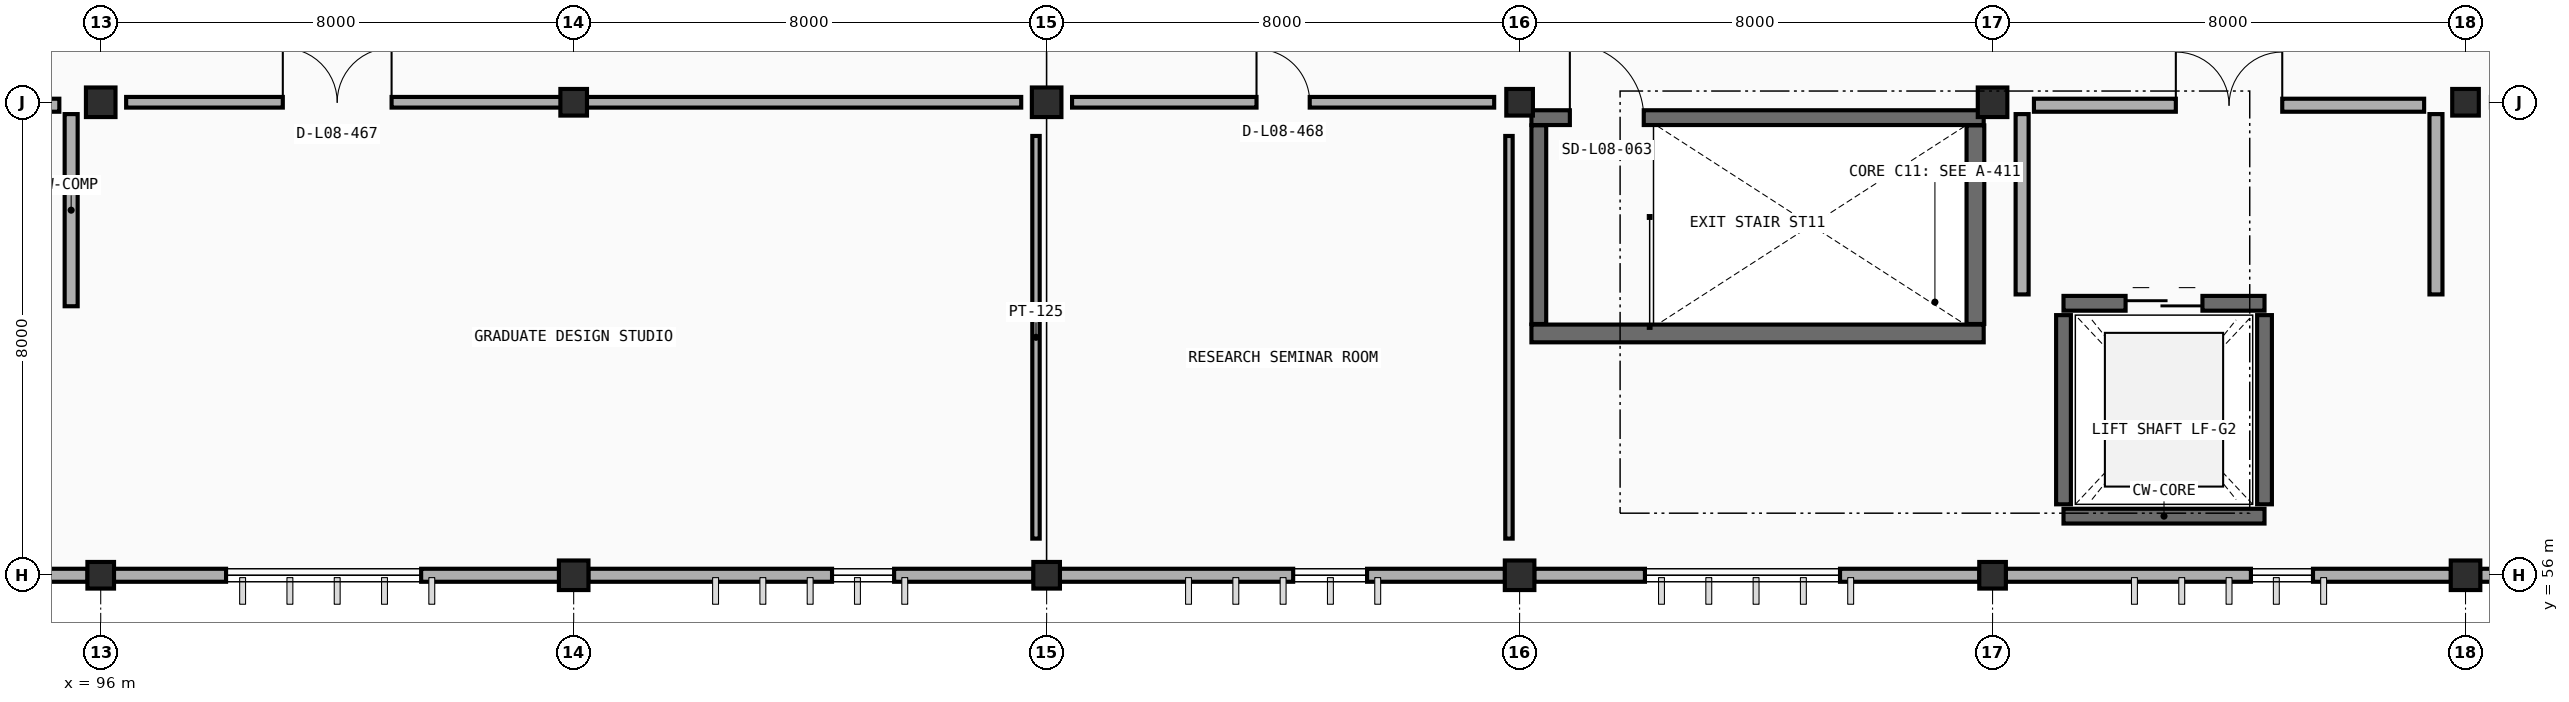
"""IFC4 building model, lengths in metres.
Left out: names, types, materials, properties, quantities, classifications, styles, units other than length and angle.
Written with IfcOpenShell. Run it as: python <this file> out.ifc"""

import sys

from ifc_helpers import new_model, si_unit, direction, frame, frame_2d, origin, origin_2d, place, context, subcontext, project, spatial, rectangle, extrude, element, fill, save


model = new_model("IFC4")
c1 = context("Model", 3, precision=1e-05, world=origin(), true_north=direction((0.0, 1.0)))
c2 = subcontext(c1, "Body", "Model", "MODEL_VIEW")
j1 = project(units=[si_unit("LENGTHUNIT", "METRE"), si_unit("PLANEANGLEUNIT", "RADIAN")], contexts=[c1])
p1 = place(None, origin())
s1 = spatial("IfcSite", under=j1, at=p1, CompositionType="ELEMENT")
p2 = place(p1, origin())
s2 = spatial("IfcBuilding", under=s1, at=p2, CompositionType="ELEMENT")
p3 = place(p2, frame((0.0, 0.0, 30.6)))
s3 = spatial("IfcBuildingStorey", under=s2, at=p3, CompositionType="ELEMENT", Elevation=30.6)
p4 = place(p3, frame((96.0, 56.0, 0.0), z_axis=(0.0, 0.0, 1.0), x_axis=(1.0, 0.0, 0.0)))
e1 = element("IfcColumn", 1, at=p4, inside=s3, PredefinedType="COLUMN", context=c2, shape_type="SweptSolid", body=[
    extrude(rectangle(XDim=0.45, YDim=0.45, at=origin_2d()), origin(), (0.0, 0.0, 1.0), 4.2),
])
p5 = place(p3, frame((104.0, 56.0, 0.0), z_axis=(0.0, 0.0, 1.0), x_axis=(1.0, 0.0, 0.0)))
e2 = element("IfcColumn", 2, at=p5, inside=s3, PredefinedType="COLUMN", context=c2, shape_type="SweptSolid", body=[
    extrude(rectangle(XDim=0.5, YDim=0.5, at=origin_2d()), origin(), (0.0, 0.0, 1.0), 4.2),
])
p6 = place(p3, frame((112.0, 56.0, 0.0), z_axis=(0.0, 0.0, 1.0), x_axis=(1.0, 0.0, 0.0)))
e3 = element("IfcColumn", 3, at=p6, inside=s3, PredefinedType="COLUMN", context=c2, shape_type="SweptSolid", body=[
    extrude(rectangle(XDim=0.45, YDim=0.45, at=origin_2d()), origin(), (0.0, 0.0, 1.0), 4.2),
])
p7 = place(p3, frame((120.0, 56.0, 0.0), z_axis=(0.0, 0.0, 1.0), x_axis=(1.0, 0.0, 0.0)))
e4 = element("IfcColumn", 4, at=p7, inside=s3, PredefinedType="COLUMN", context=c2, shape_type="SweptSolid", body=[
    extrude(rectangle(XDim=0.5, YDim=0.5, at=origin_2d()), origin(), (0.0, 0.0, 1.0), 4.2),
])
p8 = place(p3, frame((128.0, 56.0, 0.0), z_axis=(0.0, 0.0, 1.0), x_axis=(1.0, 0.0, 0.0)))
e5 = element("IfcColumn", 5, at=p8, inside=s3, PredefinedType="COLUMN", context=c2, shape_type="SweptSolid", body=[
    extrude(rectangle(XDim=0.45, YDim=0.45, at=origin_2d()), origin(), (0.0, 0.0, 1.0), 4.2),
])
for number, where, z_axis, x_axis in (
    (6, (136.0, 56.0, 0.0), (0.0, 0.0, 1.0), (1.0, 0.0, 0.0)),
    (7, (96.0, 64.0, 0.0), (0.0, 0.0, 1.0), (1.0, 0.0, 0.0)),
):
    element("IfcColumn", number, at=place(p3, frame(where, z_axis=z_axis, x_axis=x_axis)), inside=s3, PredefinedType="COLUMN", context=c2, shape_type="SweptSolid", body=[
        extrude(rectangle(XDim=0.5, YDim=0.5, at=origin_2d()), origin(), (0.0, 0.0, 1.0), 4.2),
    ])
p9 = place(p3, frame((104.0, 64.0, 0.0), z_axis=(0.0, 0.0, 1.0), x_axis=(1.0, 0.0, 0.0)))
e8 = element("IfcColumn", 8, at=p9, inside=s3, PredefinedType="COLUMN", context=c2, shape_type="SweptSolid", body=[
    extrude(rectangle(XDim=0.45, YDim=0.45, at=origin_2d()), origin(), (0.0, 0.0, 1.0), 4.2),
])
p10 = place(p3, frame((112.0, 64.0, 0.0), z_axis=(0.0, 0.0, 1.0), x_axis=(1.0, 0.0, 0.0)))
e9 = element("IfcColumn", 9, at=p10, inside=s3, PredefinedType="COLUMN", context=c2, shape_type="SweptSolid", body=[
    extrude(rectangle(XDim=0.5, YDim=0.5, at=origin_2d()), origin(), (0.0, 0.0, 1.0), 4.2),
])
p11 = place(p3, frame((120.0, 64.0, 0.0), z_axis=(0.0, 0.0, 1.0), x_axis=(1.0, 0.0, 0.0)))
e10 = element("IfcColumn", 10, at=p11, inside=s3, PredefinedType="COLUMN", context=c2, shape_type="SweptSolid", body=[
    extrude(rectangle(XDim=0.45, YDim=0.45, at=origin_2d()), origin(), (0.0, 0.0, 1.0), 4.2),
])
p12 = place(p3, frame((128.0, 64.0, 0.0), z_axis=(0.0, 0.0, 1.0), x_axis=(1.0, 0.0, 0.0)))
e11 = element("IfcColumn", 11, at=p12, inside=s3, PredefinedType="COLUMN", context=c2, shape_type="SweptSolid", body=[
    extrude(rectangle(XDim=0.5, YDim=0.5, at=origin_2d()), origin(), (0.0, 0.0, 1.0), 4.2),
])
p13 = place(p3, frame((136.0, 64.0, 0.0), z_axis=(0.0, 0.0, 1.0), x_axis=(1.0, 0.0, 0.0)))
e12 = element("IfcColumn", 12, at=p13, inside=s3, PredefinedType="COLUMN", context=c2, shape_type="SweptSolid", body=[
    extrude(rectangle(XDim=0.45, YDim=0.45, at=origin_2d()), origin(), (0.0, 0.0, 1.0), 4.2),
])
p14 = place(p3, frame((95.778, 56.0, 0.0), z_axis=(0.0, 0.0, 1.0), x_axis=(-1.0, 0.0, 0.0)))
e13 = element("IfcWall", 13, at=p14, inside=s3, PredefinedType="STANDARD", context=c2, shape_type="SweptSolid", body=[
    extrude(rectangle(XDim=7.531, YDim=0.22, at=frame_2d((3.766, 0.0))), origin(), (0.0, 0.0, 1.0), 3.335),
])
p15 = place(p14, frame((2.358, 0.0, 0.9)))
e14 = element("IfcOpeningElement", 14, at=p15, cuts=e13, PredefinedType="OPENING", context=c2, shape_type="SweptSolid", body=[
    extrude(rectangle(XDim=1.25, YDim=1.25, at=frame_2d((0.625, 0.625))), frame((0.0, 0.12, 0.0), z_axis=(0.0, -1.0, 0.0), x_axis=(1.0, 0.0, 0.0)), (0.0, 0.0, 1.0), 0.24),
])
p16 = place(p3, frame((103.753, 56.0, 0.0), z_axis=(0.0, 0.0, 1.0), x_axis=(-1.0, 0.0, 0.0)))
e15 = element("IfcWall", 15, at=p16, inside=s3, PredefinedType="STANDARD", context=c2, shape_type="SweptSolid", body=[
    extrude(rectangle(XDim=7.531, YDim=0.22, at=frame_2d((3.766, 0.0))), origin(), (0.0, 0.0, 1.0), 3.335),
])
p17 = place(p16, frame((2.333, 0.0, 0.9)))
e16 = element("IfcOpeningElement", 16, at=p17, cuts=e15, PredefinedType="OPENING", context=c2, shape_type="SweptSolid", body=[
    extrude(rectangle(XDim=3.3, YDim=1.75, at=frame_2d((1.65, 0.875))), frame((0.0, 0.12, 0.0), z_axis=(0.0, -1.0, 0.0), x_axis=(1.0, 0.0, 0.0)), (0.0, 0.0, 1.0), 0.24),
])
p18 = place(p3, frame((111.778, 56.0, 0.0), z_axis=(0.0, 0.0, 1.0), x_axis=(-1.0, 0.0, 0.0)))
e17 = element("IfcWall", 17, at=p18, inside=s3, PredefinedType="STANDARD", context=c2, shape_type="SweptSolid", body=[
    extrude(rectangle(XDim=7.531, YDim=0.22, at=frame_2d((3.766, 0.0))), origin(), (0.0, 0.0, 1.0), 3.335),
])
p19 = place(p18, frame((2.358, 0.0, 0.9)))
e18 = element("IfcOpeningElement", 18, at=p19, cuts=e17, PredefinedType="OPENING", context=c2, shape_type="SweptSolid", body=[
    extrude(rectangle(XDim=1.05, YDim=1.25, at=frame_2d((0.525, 0.625))), frame((0.0, 0.12, 0.0), z_axis=(0.0, -1.0, 0.0), x_axis=(1.0, 0.0, 0.0)), (0.0, 0.0, 1.0), 0.24),
])
p20 = place(p3, frame((119.753, 56.0, 0.0), z_axis=(0.0, 0.0, 1.0), x_axis=(-1.0, 0.0, 0.0)))
e19 = element("IfcWall", 19, at=p20, inside=s3, PredefinedType="STANDARD", context=c2, shape_type="SweptSolid", body=[
    extrude(rectangle(XDim=7.531, YDim=0.22, at=frame_2d((3.766, 0.0))), origin(), (0.0, 0.0, 1.0), 3.335),
])
p21 = place(p20, frame((2.333, 0.0, 0.9)))
e20 = element("IfcOpeningElement", 20, at=p21, cuts=e19, PredefinedType="OPENING", context=c2, shape_type="SweptSolid", body=[
    extrude(rectangle(XDim=1.25, YDim=1.25, at=frame_2d((0.625, 0.625))), frame((0.0, 0.12, 0.0), z_axis=(0.0, -1.0, 0.0), x_axis=(1.0, 0.0, 0.0)), (0.0, 0.0, 1.0), 0.24),
])
p22 = place(p3, frame((127.778, 56.0, 0.0), z_axis=(0.0, 0.0, 1.0), x_axis=(-1.0, 0.0, 0.0)))
e21 = element("IfcWall", 21, at=p22, inside=s3, PredefinedType="STANDARD", context=c2, shape_type="SweptSolid", body=[
    extrude(rectangle(XDim=7.531, YDim=0.22, at=frame_2d((3.766, 0.0))), origin(), (0.0, 0.0, 1.0), 3.335),
])
p23 = place(p22, frame((2.358, 0.0, 0.9)))
e22 = element("IfcOpeningElement", 22, at=p23, cuts=e21, PredefinedType="OPENING", context=c2, shape_type="SweptSolid", body=[
    extrude(rectangle(XDim=3.3, YDim=1.75, at=frame_2d((1.65, 0.875))), frame((0.0, 0.12, 0.0), z_axis=(0.0, -1.0, 0.0), x_axis=(1.0, 0.0, 0.0)), (0.0, 0.0, 1.0), 0.24),
])
p24 = place(p3, frame((135.753, 56.0, 0.0), z_axis=(0.0, 0.0, 1.0), x_axis=(-1.0, 0.0, 0.0)))
e23 = element("IfcWall", 23, at=p24, inside=s3, PredefinedType="STANDARD", context=c2, shape_type="SweptSolid", body=[
    extrude(rectangle(XDim=7.531, YDim=0.22, at=frame_2d((3.766, 0.0))), origin(), (0.0, 0.0, 1.0), 3.335),
])
p25 = place(p24, frame((2.333, 0.0, 0.9)))
e24 = element("IfcOpeningElement", 24, at=p25, cuts=e23, PredefinedType="OPENING", context=c2, shape_type="SweptSolid", body=[
    extrude(rectangle(XDim=1.05, YDim=1.25, at=frame_2d((0.525, 0.625))), frame((0.0, 0.12, 0.0), z_axis=(0.0, -1.0, 0.0), x_axis=(1.0, 0.0, 0.0)), (0.0, 0.0, 1.0), 0.24),
])
p26 = place(p3, frame((143.778, 56.0, 0.0), z_axis=(0.0, 0.0, 1.0), x_axis=(-1.0, 0.0, 0.0)))
e25 = element("IfcWall", 25, at=p26, inside=s3, PredefinedType="STANDARD", context=c2, shape_type="SweptSolid", body=[
    extrude(rectangle(XDim=7.531, YDim=0.22, at=frame_2d((3.766, 0.0))), origin(), (0.0, 0.0, 1.0), 3.335),
])
p27 = place(p26, frame((2.358, 0.0, 0.9)))
e26 = element("IfcOpeningElement", 26, at=p27, cuts=e25, PredefinedType="OPENING", context=c2, shape_type="SweptSolid", body=[
    extrude(rectangle(XDim=1.25, YDim=1.25, at=frame_2d((0.625, 0.625))), frame((0.0, 0.12, 0.0), z_axis=(0.0, -1.0, 0.0), x_axis=(1.0, 0.0, 0.0)), (0.0, 0.0, 1.0), 0.24),
])
p28 = place(p3, frame((120.2, 60.09, 0.0), z_axis=(0.0, 0.0, 1.0), x_axis=(1.0, 0.0, 0.0)))
e27 = element("IfcWall", 27, at=p28, inside=s3, PredefinedType="SHEAR", context=c2, shape_type="SweptSolid", body=[
    extrude(rectangle(XDim=7.65, YDim=0.3, at=frame_2d((3.825, 0.0))), origin(), (0.0, 0.0, 1.0), 4.2),
])
p29 = place(p3, frame((127.71, 60.25, 0.0), z_axis=(0.0, 0.0, 1.0), x_axis=(0.0, 1.0, 0.0)))
e28 = element("IfcWall", 28, at=p29, inside=s3, PredefinedType="SHEAR", context=c2, shape_type="SweptSolid", body=[
    extrude(rectangle(XDim=3.36, YDim=0.3, at=frame_2d((1.68, 0.0))), origin(), (0.0, 0.0, 1.0), 4.2),
])
p30 = place(p3, frame((120.2, 63.74, 0.0), z_axis=(0.0, 0.0, 1.0), x_axis=(1.0, 0.0, 0.0)))
e29 = element("IfcWall", 29, at=p30, inside=s3, PredefinedType="SOLIDWALL", context=c2, shape_type="SweptSolid", body=[
    extrude(rectangle(XDim=7.65, YDim=0.25, at=frame_2d((3.825, 0.0))), origin(), (0.0, 0.0, 1.0), 4.2),
])
p31 = place(p30, frame((0.65, 0.0, 0.0)))
e30 = element("IfcOpeningElement", 30, at=p31, cuts=e29, PredefinedType="OPENING", context=c2, shape_type="SweptSolid", body=[
    extrude(rectangle(XDim=1.25, YDim=2.15, at=frame_2d((0.625, 1.075))), frame((0.0, 0.135, 0.0), z_axis=(0.0, -1.0, 0.0), x_axis=(1.0, 0.0, 0.0)), (0.0, 0.0, 1.0), 0.27),
])
p32 = place(p3, frame((120.325, 60.25, 0.0), z_axis=(0.0, 0.0, 1.0), x_axis=(0.0, 1.0, 0.0)))
e31 = element("IfcWall", 31, at=p32, inside=s3, PredefinedType="SOLIDWALL", context=c2, shape_type="SweptSolid", body=[
    extrude(rectangle(XDim=3.36, YDim=0.25, at=frame_2d((1.68, 0.0))), origin(), (0.0, 0.0, 1.0), 4.2),
])
p33 = place(p3, frame((88.7, 63.95, 0.0), z_axis=(0.0, 0.0, 1.0), x_axis=(1.0, 0.0, 0.0)))
e32 = element("IfcWall", 32, at=p33, inside=s3, PredefinedType="PARTITIONING", context=c2, shape_type="SweptSolid", body=[
    extrude(rectangle(XDim=6.6, YDim=0.22, at=frame_2d((3.3, 0.0))), origin(), (0.0, 0.0, 1.0), 3.3),
])
p34 = place(p33, frame((2.4, 0.0, 0.0)))
e33 = element("IfcOpeningElement", 33, at=p34, cuts=e32, PredefinedType="OPENING", context=c2, shape_type="SweptSolid", body=[
    extrude(rectangle(XDim=1.8, YDim=2.2, at=frame_2d((0.9, 1.1))), frame((0.0, 0.12, 0.0), z_axis=(0.0, -1.0, 0.0), x_axis=(1.0, 0.0, 0.0)), (0.0, 0.0, 1.0), 0.24),
])
p35 = place(p3, frame((95.5, 60.55, 0.0), z_axis=(0.0, 0.0, 1.0), x_axis=(0.0, 1.0, 0.0)))
e34 = element("IfcWall", 34, at=p35, inside=s3, PredefinedType="PARTITIONING", context=c2, shape_type="SweptSolid", body=[
    extrude(rectangle(XDim=3.25, YDim=0.22, at=frame_2d((1.625, 0.0))), origin(), (0.0, 0.0, 1.0), 3.3),
])
p36 = place(p3, frame((129.2, 57.0, 0.0), z_axis=(0.0, 0.0, 1.0), x_axis=(1.0, 0.0, 0.0)))
e35 = element("IfcWall", 35, at=p36, inside=s3, PredefinedType="SOLIDWALL", context=c2, shape_type="SweptSolid", body=[
    extrude(rectangle(XDim=3.4, YDim=0.25, at=frame_2d((1.7, 0.0))), origin(), (0.0, 0.0, 1.0), 4.2),
])
p37 = place(p3, frame((129.2, 60.6, 0.0), z_axis=(0.0, 0.0, 1.0), x_axis=(1.0, 0.0, 0.0)))
e36 = element("IfcWall", 36, at=p37, inside=s3, PredefinedType="SOLIDWALL", context=c2, shape_type="SweptSolid", body=[
    extrude(rectangle(XDim=3.4, YDim=0.25, at=frame_2d((1.7, 0.0))), origin(), (0.0, 0.0, 1.0), 4.2),
])
p38 = place(p37, frame((1.05, 0.0, 0.0)))
e37 = element("IfcOpeningElement", 37, at=p38, cuts=e36, PredefinedType="OPENING", context=c2, shape_type="SweptSolid", body=[
    extrude(rectangle(XDim=1.3, YDim=2.2, at=frame_2d((0.65, 1.1))), frame((0.0, 0.135, 0.0), z_axis=(0.0, -1.0, 0.0), x_axis=(1.0, 0.0, 0.0)), (0.0, 0.0, 1.0), 0.27),
])
for number, where, z_axis, x_axis in (
    (38, (129.2, 57.2, 0.0), (0.0, 0.0, 1.0), (0.0, 1.0, 0.0)),
    (39, (132.6, 57.2, 0.0), (0.0, 0.0, 1.0), (0.0, 1.0, 0.0)),
):
    element("IfcWall", number, at=place(p3, frame(where, z_axis=z_axis, x_axis=x_axis)), inside=s3, PredefinedType="SOLIDWALL", context=c2, shape_type="SweptSolid", body=[
        extrude(rectangle(XDim=3.2, YDim=0.25, at=frame_2d((1.6, 0.0))), origin(), (0.0, 0.0, 1.0), 4.2),
    ])
p39 = place(p3, frame((128.7, 63.95, 0.0), z_axis=(0.0, 0.0, 1.0), x_axis=(1.0, 0.0, 0.0)))
e40 = element("IfcWall", 40, at=p39, inside=s3, PredefinedType="PARTITIONING", context=c2, shape_type="SweptSolid", body=[
    extrude(rectangle(XDim=6.6, YDim=0.22, at=frame_2d((3.3, 0.0))), origin(), (0.0, 0.0, 1.0), 3.3),
])
p40 = place(p39, frame((2.4, 0.0, 0.0)))
e41 = element("IfcOpeningElement", 41, at=p40, cuts=e40, PredefinedType="OPENING", context=c2, shape_type="SweptSolid", body=[
    extrude(rectangle(XDim=1.8, YDim=2.2, at=frame_2d((0.9, 1.1))), frame((0.0, 0.12, 0.0), z_axis=(0.0, -1.0, 0.0), x_axis=(1.0, 0.0, 0.0)), (0.0, 0.0, 1.0), 0.24),
])
for number, where, z_axis, x_axis in (
    (42, (128.5, 60.75, 0.0), (0.0, 0.0, 1.0), (0.0, 1.0, 0.0)),
    (43, (135.5, 60.75, 0.0), (0.0, 0.0, 1.0), (0.0, 1.0, 0.0)),
):
    element("IfcWall", number, at=place(p3, frame(where, z_axis=z_axis, x_axis=x_axis)), inside=s3, PredefinedType="PARTITIONING", context=c2, shape_type="SweptSolid", body=[
        extrude(rectangle(XDim=3.05, YDim=0.22, at=frame_2d((1.525, 0.0))), origin(), (0.0, 0.0, 1.0), 3.3),
    ])
p41 = place(p3, frame((96.43, 64.0, 0.0), z_axis=(0.0, 0.0, 1.0), x_axis=(1.0, 0.0, 0.0)))
e44 = element("IfcWall", 44, at=p41, inside=s3, PredefinedType="PARTITIONING", context=c2, shape_type="SweptSolid", body=[
    extrude(rectangle(XDim=15.14, YDim=0.18, at=frame_2d((7.57, 0.0))), origin(), (0.0, 0.0, 1.0), 3.3),
])
p42 = place(p41, frame((2.65, 0.0, 0.0)))
e45 = element("IfcOpeningElement", 45, at=p42, cuts=e44, PredefinedType="OPENING", context=c2, shape_type="SweptSolid", body=[
    extrude(rectangle(XDim=1.84, YDim=2.25, at=frame_2d((0.92, 1.125))), frame((0.0, 0.1, 0.0), z_axis=(0.0, -1.0, 0.0), x_axis=(1.0, 0.0, 0.0)), (0.0, 0.0, 1.0), 0.2),
])
p43 = place(p3, frame((111.82, 56.62, 0.0), z_axis=(0.0, 0.0, 1.0), x_axis=(0.0, 1.0, 0.0)))
e46 = element("IfcWall", 46, at=p43, inside=s3, PredefinedType="PARTITIONING", context=c2, shape_type="SweptSolid", body=[
    extrude(rectangle(XDim=6.81, YDim=0.125, at=frame_2d((3.405, 0.0))), origin(), (0.0, 0.0, 1.0), 3.3),
])
p44 = place(p3, frame((112.43, 64.0, 0.0), z_axis=(0.0, 0.0, 1.0), x_axis=(1.0, 0.0, 0.0)))
e47 = element("IfcWall", 47, at=p44, inside=s3, PredefinedType="PARTITIONING", context=c2, shape_type="SweptSolid", body=[
    extrude(rectangle(XDim=7.14, YDim=0.18, at=frame_2d((3.57, 0.0))), origin(), (0.0, 0.0, 1.0), 3.3),
])
p45 = place(p44, frame((3.12, 0.0, 0.0)))
e48 = element("IfcOpeningElement", 48, at=p45, cuts=e47, PredefinedType="OPENING", context=c2, shape_type="SweptSolid", body=[
    extrude(rectangle(XDim=0.9, YDim=2.1, at=frame_2d((0.45, 1.05))), frame((0.0, 0.1, 0.0), z_axis=(0.0, -1.0, 0.0), x_axis=(1.0, 0.0, 0.0)), (0.0, 0.0, 1.0), 0.2),
])
p46 = place(p3, frame((119.82, 56.62, 0.0), z_axis=(0.0, 0.0, 1.0), x_axis=(0.0, 1.0, 0.0)))
e49 = element("IfcWall", 49, at=p46, inside=s3, PredefinedType="PARTITIONING", context=c2, shape_type="SweptSolid", body=[
    extrude(rectangle(XDim=6.81, YDim=0.125, at=frame_2d((3.405, 0.0))), origin(), (0.0, 0.0, 1.0), 3.3),
])
p47 = place(p17, origin())
e50 = element("IfcWindow", 50, at=p47, inside=s3, PartitioningType="DOUBLE_PANEL_VERTICAL", PredefinedType="WINDOW", context=c2, shape_type="SweptSolid", body=[
    extrude(rectangle(XDim=3.3, YDim=1.75, at=frame_2d((1.65, 0.875))), frame((0.0, 0.03, 0.0), z_axis=(0.0, -1.0, 0.0), x_axis=(1.0, 0.0, 0.0)), (0.0, 0.0, 1.0), 0.06),
])
fill(e16, e50)
p48 = place(p19, origin())
e51 = element("IfcWindow", 51, at=p48, inside=s3, PartitioningType="SINGLE_PANEL", PredefinedType="WINDOW", context=c2, shape_type="SweptSolid", body=[
    extrude(rectangle(XDim=1.05, YDim=1.25, at=frame_2d((0.525, 0.625))), frame((0.0, 0.03, 0.0), z_axis=(0.0, -1.0, 0.0), x_axis=(1.0, 0.0, 0.0)), (0.0, 0.0, 1.0), 0.06),
])
fill(e18, e51)
p49 = place(p21, origin())
e52 = element("IfcWindow", 52, at=p49, inside=s3, PartitioningType="SINGLE_PANEL", PredefinedType="WINDOW", context=c2, shape_type="SweptSolid", body=[
    extrude(rectangle(XDim=1.25, YDim=1.25, at=frame_2d((0.625, 0.625))), frame((0.0, 0.03, 0.0), z_axis=(0.0, -1.0, 0.0), x_axis=(1.0, 0.0, 0.0)), (0.0, 0.0, 1.0), 0.06),
])
fill(e20, e52)
p50 = place(p23, origin())
e53 = element("IfcWindow", 53, at=p50, inside=s3, PartitioningType="DOUBLE_PANEL_VERTICAL", PredefinedType="WINDOW", context=c2, shape_type="SweptSolid", body=[
    extrude(rectangle(XDim=3.3, YDim=1.75, at=frame_2d((1.65, 0.875))), frame((0.0, 0.03, 0.0), z_axis=(0.0, -1.0, 0.0), x_axis=(1.0, 0.0, 0.0)), (0.0, 0.0, 1.0), 0.06),
])
fill(e22, e53)
p51 = place(p25, origin())
e54 = element("IfcWindow", 54, at=p51, inside=s3, PartitioningType="SINGLE_PANEL", PredefinedType="WINDOW", context=c2, shape_type="SweptSolid", body=[
    extrude(rectangle(XDim=1.05, YDim=1.25, at=frame_2d((0.525, 0.625))), frame((0.0, 0.03, 0.0), z_axis=(0.0, -1.0, 0.0), x_axis=(1.0, 0.0, 0.0)), (0.0, 0.0, 1.0), 0.06),
])
fill(e24, e54)
p52 = place(p31, origin())
e55 = element("IfcDoor", 55, at=p52, inside=s3, OperationType="SINGLE_SWING_LEFT", PredefinedType="DOOR", context=c2, shape_type="SweptSolid", body=[
    extrude(rectangle(XDim=1.25, YDim=2.15, at=frame_2d((0.625, 1.075))), frame((0.0, 0.025, 0.0), z_axis=(0.0, -1.0, 0.0), x_axis=(1.0, 0.0, 0.0)), (0.0, 0.0, 1.0), 0.05),
])
fill(e30, e55)
p53 = place(p38, origin())
e56 = element("IfcDoor", 56, at=p53, inside=s3, OperationType="DOUBLE_DOOR_SLIDING", PredefinedType="DOOR", context=c2, shape_type="SweptSolid", body=[
    extrude(rectangle(XDim=1.3, YDim=2.2, at=frame_2d((0.65, 1.1))), frame((0.0, 0.025, 0.0), z_axis=(0.0, -1.0, 0.0), x_axis=(1.0, 0.0, 0.0)), (0.0, 0.0, 1.0), 0.05),
])
fill(e37, e56)
p54 = place(p40, origin())
e57 = element("IfcDoor", 57, at=p54, inside=s3, OperationType="DOUBLE_DOOR_SINGLE_SWING", PredefinedType="DOOR", context=c2, shape_type="SweptSolid", body=[
    extrude(rectangle(XDim=1.8, YDim=2.2, at=frame_2d((0.9, 1.1))), frame((0.0, 0.025, 0.0), z_axis=(0.0, -1.0, 0.0), x_axis=(1.0, 0.0, 0.0)), (0.0, 0.0, 1.0), 0.05),
])
fill(e41, e57)
p55 = place(p42, origin())
e58 = element("IfcDoor", 58, at=p55, inside=s3, OperationType="DOUBLE_DOOR_SINGLE_SWING", PredefinedType="DOOR", context=c2, shape_type="SweptSolid", body=[
    extrude(rectangle(XDim=1.84, YDim=2.25, at=frame_2d((0.92, 1.125))), frame((0.0, 0.025, 0.0), z_axis=(0.0, -1.0, 0.0), x_axis=(1.0, 0.0, 0.0)), (0.0, 0.0, 1.0), 0.05),
])
fill(e45, e58)
p56 = place(p45, origin())
e59 = element("IfcDoor", 59, at=p56, inside=s3, OperationType="SINGLE_SWING_LEFT", PredefinedType="DOOR", context=c2, shape_type="SweptSolid", body=[
    extrude(rectangle(XDim=0.9, YDim=2.1, at=frame_2d((0.45, 1.05))), frame((0.0, 0.025, 0.0), z_axis=(0.0, -1.0, 0.0), x_axis=(1.0, 0.0, 0.0)), (0.0, 0.0, 1.0), 0.05),
])
fill(e48, e59)
save(model, sys.argv[1])
